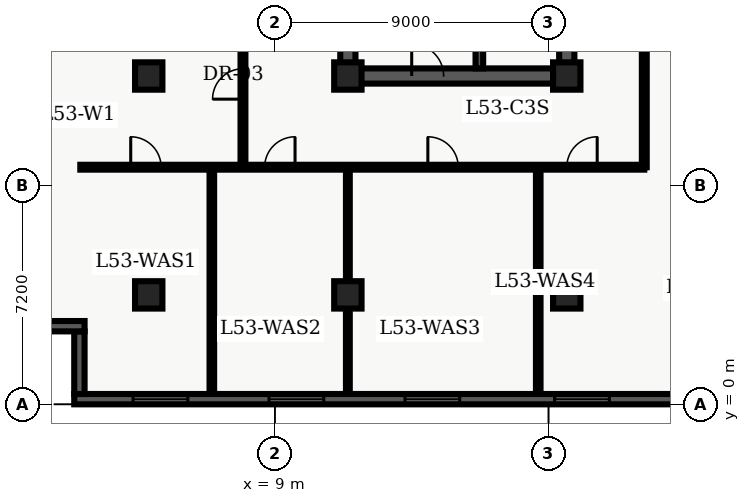
"""IFC4 building model, lengths in metres.
Left out: names, types, materials, properties, quantities, classifications, styles, units other than length and angle.
Written with IfcOpenShell. Run it as: python <this file> out.ifc"""

import sys

from ifc_helpers import new_model, entity, si_unit, converted_unit, direction, frame, origin_with_axes, origin_2d_with_axis, place, context, subcontext, project, spatial, polyline, rectangle, outline, extrude, element, fill, save


model = new_model("IFC4")
c1 = context("Model", 3, precision=1e-05, world=origin_with_axes(), true_north=direction((0.0, 1.0)))
c2 = subcontext(c1, "Body", "Model", "MODEL_VIEW")
j1 = project(units=[si_unit("LENGTHUNIT", "METRE"), converted_unit("PLANEANGLEUNIT", "DEGREE", entity("IfcPlaneAngleMeasure", 0.017), si_unit("PLANEANGLEUNIT", "RADIAN"), dimensions=[0, 0, 0, 0, 0, 0, 0])], contexts=[c1])
p1 = place(None, origin_with_axes())
s1 = spatial("IfcSite", under=j1, at=p1, CompositionType="ELEMENT")
p2 = place(p1, origin_with_axes())
s2 = spatial("IfcBuilding", under=s1, at=p2, CompositionType="ELEMENT")
p3 = place(p2, frame((0.0, 0.0, 216.0), z_axis=(0.0, 0.0, 1.0), x_axis=(1.0, 0.0, 0.0)))
s3 = spatial("IfcBuildingStorey", under=s2, at=p3, CompositionType="ELEMENT", Elevation=216.0)
p4 = place(p3, frame((11.4, 10.8, 0.0), z_axis=(0.0, 0.0, 1.0), x_axis=(0.0, 1.0, 0.0)))
e1 = element("IfcWall", 1, at=p4, inside=s3, PredefinedType="SHEAR", context=c2, shape_type="SweptSolid", body=[
    extrude(outline(polyline([(0.0, -0.25), (27.0, -0.25), (27.0, 0.25), (0.0, 0.25), (0.0, -0.25)])), origin_with_axes(), (0.0, 0.0, 1.0), 3.6),
])
p5 = place(p3, frame((11.4, 10.8, 0.0), z_axis=(0.0, 0.0, 1.0), x_axis=(1.0, 0.0, 0.0)))
e2 = element("IfcWall", 2, at=p5, inside=s3, PredefinedType="SHEAR", context=c2, shape_type="SweptSolid", body=[
    extrude(outline(polyline([(0.0, -0.25), (7.2, -0.25), (7.2, 0.25), (0.0, 0.25), (0.0, -0.25)])), origin_with_axes(), (0.0, 0.0, 1.0), 3.6),
])
p6 = place(p5, frame((2.625, 0.0, 0.0), z_axis=(0.0, 0.0, 1.0), x_axis=(1.0, 0.0, 0.0)))
e3 = element("IfcOpeningElement", 3, at=p6, cuts=e2, PredefinedType="OPENING", context=c2, shape_type="SweptSolid", body=[
    extrude(rectangle(XDim=1.05, YDim=0.52, at=origin_2d_with_axis()), origin_with_axes(), (0.0, 0.0, 1.0), 2.15),
])
p7 = place(p3, frame((18.6, 10.8, 0.0), z_axis=(0.0, 0.0, 1.0), x_axis=(0.0, 1.0, 0.0)))
e4 = element("IfcWall", 4, at=p7, inside=s3, PredefinedType="SHEAR", context=c2, shape_type="SweptSolid", body=[
    extrude(outline(polyline([(0.0, -0.25), (13.5, -0.25), (13.5, 0.25), (0.0, 0.25), (0.0, -0.25)])), origin_with_axes(), (0.0, 0.0, 1.0), 3.6),
])
p8 = place(p7, frame((11.125, 0.0, 0.0), z_axis=(0.0, 0.0, 1.0), x_axis=(1.0, 0.0, 0.0)))
e5 = element("IfcOpeningElement", 5, at=p8, cuts=e4, PredefinedType="OPENING", context=c2, shape_type="SweptSolid", body=[
    extrude(rectangle(XDim=1.05, YDim=0.52, at=origin_2d_with_axis()), origin_with_axes(), (0.0, 0.0, 1.0), 2.15),
])
p9 = place(p7, frame((2.125, 0.0, 0.0), z_axis=(0.0, 0.0, 1.0), x_axis=(1.0, 0.0, 0.0)))
e6 = element("IfcOpeningElement", 6, at=p9, cuts=e4, PredefinedType="OPENING", context=c2, shape_type="SweptSolid", body=[
    extrude(rectangle(XDim=0.95, YDim=0.52, at=origin_2d_with_axis()), origin_with_axes(), (0.0, 0.0, 1.0), 2.15),
])
p10 = place(p7, frame((6.275, 0.0, 0.0), z_axis=(0.0, 0.0, 1.0), x_axis=(1.0, 0.0, 0.0)))
e7 = element("IfcOpeningElement", 7, at=p10, cuts=e4, PredefinedType="OPENING", context=c2, shape_type="SweptSolid", body=[
    extrude(rectangle(XDim=0.95, YDim=0.52, at=origin_2d_with_axis()), origin_with_axes(), (0.0, 0.0, 1.0), 2.15),
])
p11 = place(p3, frame((15.725, 11.05, 0.0), z_axis=(0.0, 0.0, 1.0), x_axis=(0.0, 1.0, 0.0)))
e8 = element("IfcWall", 8, at=p11, inside=s3, PredefinedType="SHEAR", context=c2, shape_type="SweptSolid", body=[
    extrude(outline(polyline([(0.0, -0.125), (8.65, -0.125), (8.65, 0.125), (0.0, 0.125), (0.0, -0.125)])), origin_with_axes(), (0.0, 0.0, 1.0), 3.6),
])
for number, where, z_axis, x_axis in (
    (9, (11.4, 3.6, 0.0), (0.0, 0.0, 1.0), (1.0, 0.0, 0.0)),
    (10, (11.4, 10.8, 0.0), (0.0, 0.0, 1.0), (1.0, 0.0, 0.0)),
    (11, (18.6, 3.6, 0.0), (0.0, 0.0, 1.0), (1.0, 0.0, 0.0)),
    (12, (18.6, 10.8, 0.0), (0.0, 0.0, 1.0), (1.0, 0.0, 0.0)),
    (13, (4.85, 3.6, 0.0), (0.0, 0.0, 1.0), (1.0, 0.0, 0.0)),
    (14, (4.85, 10.8, 0.0), (0.0, 0.0, 1.0), (1.0, 0.0, 0.0)),
):
    element("IfcColumn", number, at=place(p3, frame(where, z_axis=z_axis, x_axis=x_axis)), inside=s3, PredefinedType="COLUMN", context=c2, shape_type="SweptSolid", body=[
        extrude(rectangle(XDim=0.9, YDim=0.9, at=origin_2d_with_axis()), origin_with_axes(), (0.0, 0.0, 1.0), 3.9),
    ])
p12 = place(p3, frame((2.6, 7.8, 0.0), z_axis=(0.0, 0.0, 1.0), x_axis=(1.0, 0.0, 0.0)))
e15 = element("IfcWall", 15, at=p12, inside=s3, PredefinedType="PARTITIONING", context=c2, shape_type="SweptSolid", body=[
    extrude(outline(polyline([(0.0, -0.08), (18.55, -0.08), (18.55, 0.08), (0.0, 0.08), (0.0, -0.08)])), origin_with_axes(), (0.0, 0.0, 1.0), 2.64),
])
p13 = place(p12, frame((2.158, 0.0, 0.0), z_axis=(0.0, 0.0, 1.0), x_axis=(1.0, 0.0, 0.0)))
e16 = element("IfcOpeningElement", 16, at=p13, cuts=e15, PredefinedType="OPENING", context=c2, shape_type="SweptSolid", body=[
    extrude(rectangle(XDim=1.0, YDim=0.18, at=origin_2d_with_axis()), origin_with_axes(), (0.0, 0.0, 1.0), 2.15),
])
p14 = place(p12, frame((6.563, 0.0, 0.0), z_axis=(0.0, 0.0, 1.0), x_axis=(1.0, 0.0, 0.0)))
e17 = element("IfcOpeningElement", 17, at=p14, cuts=e15, PredefinedType="OPENING", context=c2, shape_type="SweptSolid", body=[
    extrude(rectangle(XDim=1.0, YDim=0.18, at=origin_2d_with_axis()), origin_with_axes(), (0.0, 0.0, 1.0), 2.15),
])
p15 = place(p12, frame((11.931, 0.0, 0.0), z_axis=(0.0, 0.0, 1.0), x_axis=(1.0, 0.0, 0.0)))
e18 = element("IfcOpeningElement", 18, at=p15, cuts=e15, PredefinedType="OPENING", context=c2, shape_type="SweptSolid", body=[
    extrude(rectangle(XDim=1.0, YDim=0.18, at=origin_2d_with_axis()), origin_with_axes(), (0.0, 0.0, 1.0), 2.15),
])
p16 = place(p12, frame((16.501, 0.0, 0.0), z_axis=(0.0, 0.0, 1.0), x_axis=(1.0, 0.0, 0.0)))
e19 = element("IfcOpeningElement", 19, at=p16, cuts=e15, PredefinedType="OPENING", context=c2, shape_type="SweptSolid", body=[
    extrude(rectangle(XDim=1.0, YDim=0.18, at=origin_2d_with_axis()), origin_with_axes(), (0.0, 0.0, 1.0), 2.15),
])
p17 = place(p3, frame((21.15, 7.8, 0.0), z_axis=(0.0, 0.0, 1.0), x_axis=(0.0, 1.0, 0.0)))
e20 = element("IfcWall", 20, at=p17, inside=s3, PredefinedType="PARTITIONING", context=c2, shape_type="SweptSolid", body=[
    extrude(outline(polyline([(0.0, -0.08), (32.7, -0.08), (32.7, 0.08), (0.0, 0.08), (0.0, -0.08)])), origin_with_axes(), (0.0, 0.0, 1.0), 2.64),
])
p18 = place(p17, frame((16.495, 0.0, 0.0), z_axis=(0.0, 0.0, 1.0), x_axis=(1.0, 0.0, 0.0)))
e21 = element("IfcOpeningElement", 21, at=p18, cuts=e20, PredefinedType="OPENING", context=c2, shape_type="SweptSolid", body=[
    extrude(rectangle(XDim=1.0, YDim=0.18, at=origin_2d_with_axis()), origin_with_axes(), (0.0, 0.0, 1.0), 2.15),
])
p19 = place(p17, frame((22.084, 0.0, 0.0), z_axis=(0.0, 0.0, 1.0), x_axis=(1.0, 0.0, 0.0)))
e22 = element("IfcOpeningElement", 22, at=p19, cuts=e20, PredefinedType="OPENING", context=c2, shape_type="SweptSolid", body=[
    extrude(rectangle(XDim=1.0, YDim=0.18, at=origin_2d_with_axis()), origin_with_axes(), (0.0, 0.0, 1.0), 2.15),
])
p20 = place(p17, frame((28.839, 0.0, 0.0), z_axis=(0.0, 0.0, 1.0), x_axis=(1.0, 0.0, 0.0)))
e23 = element("IfcOpeningElement", 23, at=p20, cuts=e20, PredefinedType="OPENING", context=c2, shape_type="SweptSolid", body=[
    extrude(rectangle(XDim=1.0, YDim=0.18, at=origin_2d_with_axis()), origin_with_axes(), (0.0, 0.0, 1.0), 2.15),
])
p21 = place(p17, frame((5.775, 0.0, 0.0), z_axis=(0.0, 0.0, 1.0), x_axis=(1.0, 0.0, 0.0)))
e24 = element("IfcOpeningElement", 24, at=p21, cuts=e20, PredefinedType="OPENING", context=c2, shape_type="SweptSolid", body=[
    extrude(rectangle(XDim=1.05, YDim=0.18, at=origin_2d_with_axis()), origin_with_axes(), (0.0, 0.0, 1.0), 2.15),
])
p22 = place(p3, frame((7.95, 7.8, 0.0), z_axis=(0.0, 0.0, 1.0), x_axis=(0.0, 1.0, 0.0)))
e25 = element("IfcWall", 25, at=p22, inside=s3, PredefinedType="PARTITIONING", context=c2, shape_type="SweptSolid", body=[
    extrude(outline(polyline([(0.0, -0.08), (32.7, -0.08), (32.7, 0.08), (0.0, 0.08), (0.0, -0.08)])), origin_with_axes(), (0.0, 0.0, 1.0), 2.64),
])
p23 = place(p22, frame((2.739, 0.0, 0.0), z_axis=(0.0, 0.0, 1.0), x_axis=(1.0, 0.0, 0.0)))
e26 = element("IfcOpeningElement", 26, at=p23, cuts=e25, PredefinedType="OPENING", context=c2, shape_type="SweptSolid", body=[
    extrude(rectangle(XDim=1.0, YDim=0.18, at=origin_2d_with_axis()), origin_with_axes(), (0.0, 0.0, 1.0), 2.15),
])
p24 = place(p22, frame((8.441, 0.0, 0.0), z_axis=(0.0, 0.0, 1.0), x_axis=(1.0, 0.0, 0.0)))
e27 = element("IfcOpeningElement", 27, at=p24, cuts=e25, PredefinedType="OPENING", context=c2, shape_type="SweptSolid", body=[
    extrude(rectangle(XDim=1.0, YDim=0.18, at=origin_2d_with_axis()), origin_with_axes(), (0.0, 0.0, 1.0), 2.15),
])
p25 = place(p22, frame((15.172, 0.0, 0.0), z_axis=(0.0, 0.0, 1.0), x_axis=(1.0, 0.0, 0.0)))
e28 = element("IfcOpeningElement", 28, at=p25, cuts=e25, PredefinedType="OPENING", context=c2, shape_type="SweptSolid", body=[
    extrude(rectangle(XDim=1.0, YDim=0.18, at=origin_2d_with_axis()), origin_with_axes(), (0.0, 0.0, 1.0), 2.15),
])
p26 = place(p22, frame((20.736, 0.0, 0.0), z_axis=(0.0, 0.0, 1.0), x_axis=(1.0, 0.0, 0.0)))
e29 = element("IfcOpeningElement", 29, at=p26, cuts=e25, PredefinedType="OPENING", context=c2, shape_type="SweptSolid", body=[
    extrude(rectangle(XDim=1.0, YDim=0.18, at=origin_2d_with_axis()), origin_with_axes(), (0.0, 0.0, 1.0), 2.15),
])
p27 = place(p22, frame((24.909, 0.0, 0.0), z_axis=(0.0, 0.0, 1.0), x_axis=(1.0, 0.0, 0.0)))
e30 = element("IfcOpeningElement", 30, at=p27, cuts=e25, PredefinedType="OPENING", context=c2, shape_type="SweptSolid", body=[
    extrude(rectangle(XDim=1.0, YDim=0.18, at=origin_2d_with_axis()), origin_with_axes(), (0.0, 0.0, 1.0), 2.15),
])
p28 = place(p22, frame((29.862, 0.0, 0.0), z_axis=(0.0, 0.0, 1.0), x_axis=(1.0, 0.0, 0.0)))
e31 = element("IfcOpeningElement", 31, at=p28, cuts=e25, PredefinedType="OPENING", context=c2, shape_type="SweptSolid", body=[
    extrude(rectangle(XDim=1.0, YDim=0.18, at=origin_2d_with_axis()), origin_with_axes(), (0.0, 0.0, 1.0), 2.15),
])
p29 = place(p3, frame((6.926, 0.335, 0.0), z_axis=(0.0, 0.0, 1.0), x_axis=(0.0, 1.0, 0.0)))
e32 = element("IfcWall", 32, at=p29, inside=s3, PredefinedType="PARTITIONING", context=c2, shape_type="SweptSolid", body=[
    extrude(outline(polyline([(0.0, -0.075), (7.365, -0.075), (7.365, 0.075), (0.0, 0.075), (0.0, -0.075)])), origin_with_axes(), (0.0, 0.0, 1.0), 2.64),
])
p30 = place(p3, frame((11.4, 0.335, 0.0), z_axis=(0.0, 0.0, 1.0), x_axis=(0.0, 1.0, 0.0)))
e33 = element("IfcWall", 33, at=p30, inside=s3, PredefinedType="PARTITIONING", context=c2, shape_type="SweptSolid", body=[
    extrude(outline(polyline([(0.0, -0.062), (7.365, -0.062), (7.365, 0.062), (0.0, 0.062), (0.0, -0.062)])), origin_with_axes(), (0.0, 0.0, 1.0), 2.64),
])
p31 = place(p3, frame((17.662, 0.335, 0.0), z_axis=(0.0, 0.0, 1.0), x_axis=(0.0, 1.0, 0.0)))
e34 = element("IfcWall", 34, at=p31, inside=s3, PredefinedType="PARTITIONING", context=c2, shape_type="SweptSolid", body=[
    extrude(outline(polyline([(0.0, -0.075), (7.365, -0.075), (7.365, 0.075), (0.0, 0.075), (0.0, -0.075)])), origin_with_axes(), (0.0, 0.0, 1.0), 2.64),
])
p32 = place(p3, frame((57.26, 0.17, 0.0), z_axis=(0.0, 0.0, 1.0), x_axis=(-1.0, 0.0, 0.0)))
e35 = element("IfcWall", 35, at=p32, inside=s3, PredefinedType="SOLIDWALL", context=c2, shape_type="SweptSolid", body=[
    extrude(outline(polyline([(0.0, -0.17), (54.86, -0.17), (54.86, 0.17), (0.0, 0.17), (0.0, -0.17)])), origin_with_axes(), (0.0, 0.0, 1.0), 3.6),
])
p33 = place(p32, frame((2.836, 0.0, 0.45), z_axis=(0.0, 0.0, 1.0), x_axis=(1.0, 0.0, 0.0)))
e36 = element("IfcOpeningElement", 36, at=p33, cuts=e35, PredefinedType="OPENING", context=c2, shape_type="SweptSolid", body=[
    extrude(rectangle(XDim=1.8, YDim=0.36, at=origin_2d_with_axis()), origin_with_axes(), (0.0, 0.0, 1.0), 2.1),
])
p34 = place(p32, frame((7.307, 0.0, 0.45), z_axis=(0.0, 0.0, 1.0), x_axis=(1.0, 0.0, 0.0)))
e37 = element("IfcOpeningElement", 37, at=p34, cuts=e35, PredefinedType="OPENING", context=c2, shape_type="SweptSolid", body=[
    extrude(rectangle(XDim=1.8, YDim=0.36, at=origin_2d_with_axis()), origin_with_axes(), (0.0, 0.0, 1.0), 2.1),
])
p35 = place(p32, frame((11.779, 0.0, 0.45), z_axis=(0.0, 0.0, 1.0), x_axis=(1.0, 0.0, 0.0)))
e38 = element("IfcOpeningElement", 38, at=p35, cuts=e35, PredefinedType="OPENING", context=c2, shape_type="SweptSolid", body=[
    extrude(rectangle(XDim=1.8, YDim=0.36, at=origin_2d_with_axis()), origin_with_axes(), (0.0, 0.0, 1.0), 2.1),
])
p36 = place(p32, frame((16.251, 0.0, 0.45), z_axis=(0.0, 0.0, 1.0), x_axis=(1.0, 0.0, 0.0)))
e39 = element("IfcOpeningElement", 39, at=p36, cuts=e35, PredefinedType="OPENING", context=c2, shape_type="SweptSolid", body=[
    extrude(rectangle(XDim=1.8, YDim=0.36, at=origin_2d_with_axis()), origin_with_axes(), (0.0, 0.0, 1.0), 2.1),
])
p37 = place(p32, frame((20.723, 0.0, 0.45), z_axis=(0.0, 0.0, 1.0), x_axis=(1.0, 0.0, 0.0)))
e40 = element("IfcOpeningElement", 40, at=p37, cuts=e35, PredefinedType="OPENING", context=c2, shape_type="SweptSolid", body=[
    extrude(rectangle(XDim=1.8, YDim=0.36, at=origin_2d_with_axis()), origin_with_axes(), (0.0, 0.0, 1.0), 2.1),
])
p38 = place(p32, frame((25.194, 0.0, 0.45), z_axis=(0.0, 0.0, 1.0), x_axis=(1.0, 0.0, 0.0)))
e41 = element("IfcOpeningElement", 41, at=p38, cuts=e35, PredefinedType="OPENING", context=c2, shape_type="SweptSolid", body=[
    extrude(rectangle(XDim=1.8, YDim=0.36, at=origin_2d_with_axis()), origin_with_axes(), (0.0, 0.0, 1.0), 2.1),
])
p39 = place(p32, frame((29.666, 0.0, 0.45), z_axis=(0.0, 0.0, 1.0), x_axis=(1.0, 0.0, 0.0)))
e42 = element("IfcOpeningElement", 42, at=p39, cuts=e35, PredefinedType="OPENING", context=c2, shape_type="SweptSolid", body=[
    extrude(rectangle(XDim=1.8, YDim=0.36, at=origin_2d_with_axis()), origin_with_axes(), (0.0, 0.0, 1.0), 2.1),
])
p40 = place(p32, frame((34.138, 0.0, 0.45), z_axis=(0.0, 0.0, 1.0), x_axis=(1.0, 0.0, 0.0)))
e43 = element("IfcOpeningElement", 43, at=p40, cuts=e35, PredefinedType="OPENING", context=c2, shape_type="SweptSolid", body=[
    extrude(rectangle(XDim=1.8, YDim=0.36, at=origin_2d_with_axis()), origin_with_axes(), (0.0, 0.0, 1.0), 2.1),
])
p41 = place(p32, frame((38.159, 0.0, 0.45), z_axis=(0.0, 0.0, 1.0), x_axis=(1.0, 0.0, 0.0)))
e44 = element("IfcOpeningElement", 44, at=p41, cuts=e35, PredefinedType="OPENING", context=c2, shape_type="SweptSolid", body=[
    extrude(rectangle(XDim=1.8, YDim=0.36, at=origin_2d_with_axis()), origin_with_axes(), (0.0, 0.0, 1.0), 2.1),
])
p42 = place(p32, frame((43.081, 0.0, 0.45), z_axis=(0.0, 0.0, 1.0), x_axis=(1.0, 0.0, 0.0)))
e45 = element("IfcOpeningElement", 45, at=p42, cuts=e35, PredefinedType="OPENING", context=c2, shape_type="SweptSolid", body=[
    extrude(rectangle(XDim=1.8, YDim=0.36, at=origin_2d_with_axis()), origin_with_axes(), (0.0, 0.0, 1.0), 2.1),
])
p43 = place(p32, frame((47.553, 0.0, 0.45), z_axis=(0.0, 0.0, 1.0), x_axis=(1.0, 0.0, 0.0)))
e46 = element("IfcOpeningElement", 46, at=p43, cuts=e35, PredefinedType="OPENING", context=c2, shape_type="SweptSolid", body=[
    extrude(rectangle(XDim=1.8, YDim=0.36, at=origin_2d_with_axis()), origin_with_axes(), (0.0, 0.0, 1.0), 2.1),
])
p44 = place(p32, frame((52.024, 0.0, 0.45), z_axis=(0.0, 0.0, 1.0), x_axis=(1.0, 0.0, 0.0)))
e47 = element("IfcOpeningElement", 47, at=p44, cuts=e35, PredefinedType="OPENING", context=c2, shape_type="SweptSolid", body=[
    extrude(rectangle(XDim=1.8, YDim=0.36, at=origin_2d_with_axis()), origin_with_axes(), (0.0, 0.0, 1.0), 2.1),
])
p45 = place(p3, frame((2.57, 0.34, 0.0), z_axis=(0.0, 0.0, 1.0), x_axis=(0.0, 1.0, 0.0)))
e48 = element("IfcWall", 48, at=p45, inside=s3, PredefinedType="SOLIDWALL", context=c2, shape_type="SweptSolid", body=[
    extrude(outline(polyline([(0.0, -0.17), (2.06, -0.17), (2.06, 0.17), (0.0, 0.17), (0.0, -0.17)])), origin_with_axes(), (0.0, 0.0, 1.0), 3.6),
])
p46 = place(p3, frame((2.74, 2.57, 0.0), z_axis=(0.0, 0.0, 1.0), x_axis=(-1.0, 0.0, 0.0)))
e49 = element("IfcWall", 49, at=p46, inside=s3, PredefinedType="SOLIDWALL", context=c2, shape_type="SweptSolid", body=[
    extrude(outline(polyline([(0.0, -0.17), (2.74, -0.17), (2.74, 0.17), (0.0, 0.17), (0.0, -0.17)])), origin_with_axes(), (0.0, 0.0, 1.0), 3.6),
])
p47 = place(p5, frame((2.625, 0.0, 0.0), z_axis=(0.0, 0.0, 1.0), x_axis=(1.0, 0.0, 0.0)))
e50 = element("IfcDoor", 50, at=p47, inside=s3, OperationType="SINGLE_SWING_LEFT", PredefinedType="DOOR", context=c2, shape_type="SweptSolid", body=[
    extrude(rectangle(XDim=1.05, YDim=0.09, at=origin_2d_with_axis()), origin_with_axes(), (0.0, 0.0, 1.0), 2.15),
])
fill(e3, e50)
p48 = place(p22, frame((2.739, 0.0, 0.0), z_axis=(0.0, 0.0, 1.0), x_axis=(1.0, 0.0, 0.0)))
e51 = element("IfcDoor", 51, at=p48, inside=s3, OperationType="SINGLE_SWING_LEFT", PredefinedType="DOOR", context=c2, shape_type="SweptSolid", body=[
    extrude(rectangle(XDim=1.0, YDim=0.09, at=origin_2d_with_axis()), origin_with_axes(), (0.0, 0.0, 1.0), 2.15),
])
fill(e26, e51)
p49 = place(p12, frame((2.158, 0.0, 0.0), z_axis=(0.0, 0.0, 1.0), x_axis=(1.0, 0.0, 0.0)))
e52 = element("IfcDoor", 52, at=p49, inside=s3, OperationType="SINGLE_SWING_LEFT", PredefinedType="DOOR", context=c2, shape_type="SweptSolid", body=[
    extrude(rectangle(XDim=1.0, YDim=0.09, at=origin_2d_with_axis()), origin_with_axes(), (0.0, 0.0, 1.0), 2.15),
])
fill(e16, e52)
p50 = place(p12, frame((6.563, 0.0, 0.0), z_axis=(0.0, 0.0, 1.0), x_axis=(1.0, 0.0, 0.0)))
e53 = element("IfcDoor", 53, at=p50, inside=s3, OperationType="SINGLE_SWING_RIGHT", PredefinedType="DOOR", context=c2, shape_type="SweptSolid", body=[
    extrude(rectangle(XDim=1.0, YDim=0.09, at=origin_2d_with_axis()), origin_with_axes(), (0.0, 0.0, 1.0), 2.15),
])
fill(e17, e53)
p51 = place(p12, frame((11.931, 0.0, 0.0), z_axis=(0.0, 0.0, 1.0), x_axis=(1.0, 0.0, 0.0)))
e54 = element("IfcDoor", 54, at=p51, inside=s3, OperationType="SINGLE_SWING_LEFT", PredefinedType="DOOR", context=c2, shape_type="SweptSolid", body=[
    extrude(rectangle(XDim=1.0, YDim=0.09, at=origin_2d_with_axis()), origin_with_axes(), (0.0, 0.0, 1.0), 2.15),
])
fill(e18, e54)
p52 = place(p12, frame((16.501, 0.0, 0.0), z_axis=(0.0, 0.0, 1.0), x_axis=(1.0, 0.0, 0.0)))
e55 = element("IfcDoor", 55, at=p52, inside=s3, OperationType="SINGLE_SWING_RIGHT", PredefinedType="DOOR", context=c2, shape_type="SweptSolid", body=[
    extrude(rectangle(XDim=1.0, YDim=0.09, at=origin_2d_with_axis()), origin_with_axes(), (0.0, 0.0, 1.0), 2.15),
])
fill(e19, e55)
p53 = place(p32, frame((38.159, 0.0, 0.45), z_axis=(0.0, 0.0, 1.0), x_axis=(1.0, 0.0, 0.0)))
e56 = element("IfcWindow", 56, at=p53, inside=s3, PredefinedType="WINDOW", context=c2, shape_type="SweptSolid", body=[
    extrude(rectangle(XDim=1.8, YDim=0.09, at=origin_2d_with_axis()), origin_with_axes(), (0.0, 0.0, 1.0), 2.1),
])
fill(e44, e56)
p54 = place(p32, frame((43.081, 0.0, 0.45), z_axis=(0.0, 0.0, 1.0), x_axis=(1.0, 0.0, 0.0)))
e57 = element("IfcWindow", 57, at=p54, inside=s3, PredefinedType="WINDOW", context=c2, shape_type="SweptSolid", body=[
    extrude(rectangle(XDim=1.8, YDim=0.09, at=origin_2d_with_axis()), origin_with_axes(), (0.0, 0.0, 1.0), 2.1),
])
fill(e45, e57)
p55 = place(p32, frame((47.553, 0.0, 0.45), z_axis=(0.0, 0.0, 1.0), x_axis=(1.0, 0.0, 0.0)))
e58 = element("IfcWindow", 58, at=p55, inside=s3, PredefinedType="WINDOW", context=c2, shape_type="SweptSolid", body=[
    extrude(rectangle(XDim=1.8, YDim=0.09, at=origin_2d_with_axis()), origin_with_axes(), (0.0, 0.0, 1.0), 2.1),
])
fill(e46, e58)
p56 = place(p32, frame((52.024, 0.0, 0.45), z_axis=(0.0, 0.0, 1.0), x_axis=(1.0, 0.0, 0.0)))
e59 = element("IfcWindow", 59, at=p56, inside=s3, PredefinedType="WINDOW", context=c2, shape_type="SweptSolid", body=[
    extrude(rectangle(XDim=1.8, YDim=0.09, at=origin_2d_with_axis()), origin_with_axes(), (0.0, 0.0, 1.0), 2.1),
])
fill(e47, e59)
save(model, sys.argv[1])
